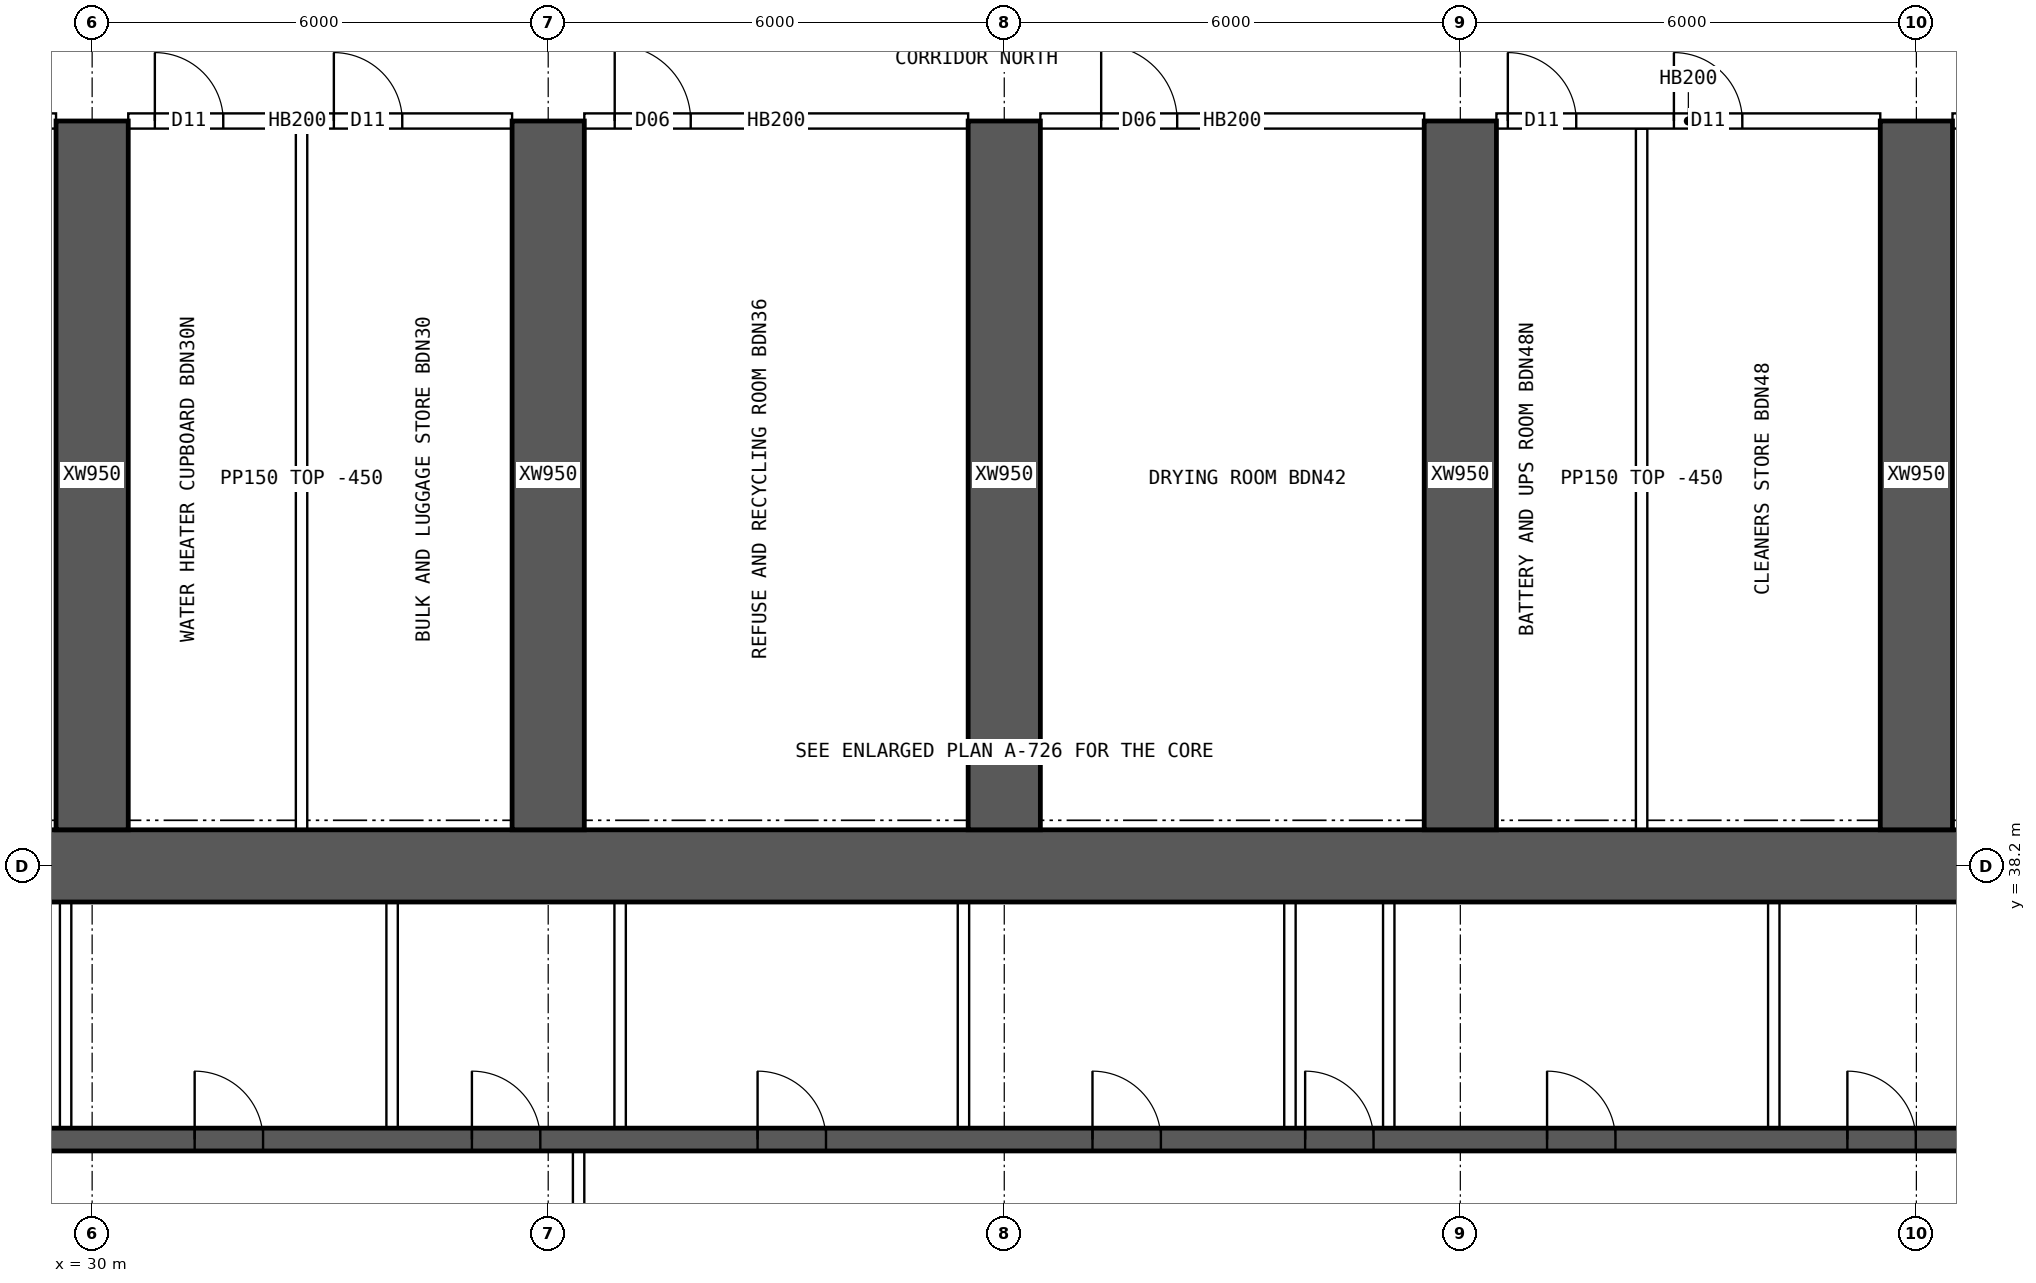
"""IFC4 building model, lengths in metres.
Left out: names, types, materials, properties, quantities, classifications, styles, units other than length and angle.
Written with IfcOpenShell. Run it as: python <this file> out.ifc"""

import sys

from ifc_helpers import new_model, si_unit, direction, frame, frame_2d, origin, place, context, subcontext, project, spatial, rectangle, extrude, element, fill, save


model = new_model("IFC4")
c1 = context("Model", 3, precision=1e-05, world=origin(), true_north=direction((0.0, 1.0)))
c2 = subcontext(c1, "Body", "Model", "MODEL_VIEW")
j1 = project(units=[si_unit("LENGTHUNIT", "METRE"), si_unit("PLANEANGLEUNIT", "RADIAN")], contexts=[c1])
p1 = place(None, origin())
s1 = spatial("IfcSite", under=j1, at=p1, CompositionType="ELEMENT")
p2 = place(p1, origin())
s2 = spatial("IfcBuilding", under=s1, at=p2, CompositionType="ELEMENT")
p3 = place(p2, frame((0.0, 0.0, 95.65)))
s3 = spatial("IfcBuildingStorey", under=s2, at=p3, CompositionType="ELEMENT", Elevation=95.65)
p4 = place(p3, frame((18.0, 38.2, 0.0), z_axis=(0.0, 0.0, 1.0), x_axis=(1.0, 0.0, 0.0)))
e1 = element("IfcWall", 1, at=p4, inside=s3, PredefinedType="SHEAR", context=c2, shape_type="SweptSolid", body=[
    extrude(rectangle(XDim=48.0, YDim=0.95, at=frame_2d((24.0, 0.0))), origin(), (0.0, 0.0, 1.0), 3.75),
])
p5 = place(p3, frame((18.475, 34.6, 0.0), z_axis=(0.0, 0.0, 1.0), x_axis=(1.0, 0.0, 0.0)))
e2 = element("IfcWall", 2, at=p5, inside=s3, PredefinedType="SHEAR", context=c2, shape_type="SweptSolid", body=[
    extrude(rectangle(XDim=47.05, YDim=0.3, at=frame_2d((23.525, 0.0))), origin(), (0.0, 0.0, 1.0), 3.75),
])
p6 = place(p5, frame((0.9, 0.0, 0.0)))
e3 = element("IfcOpeningElement", 3, at=p6, cuts=e2, PredefinedType="OPENING", context=c2, shape_type="SweptSolid", body=[
    extrude(rectangle(XDim=1.1, YDim=2.1, at=frame_2d((0.55, 1.05))), frame((0.0, 0.16, 0.0), z_axis=(0.0, -1.0, 0.0), x_axis=(1.0, 0.0, 0.0)), (0.0, 0.0, 1.0), 0.32),
])
p7 = place(p5, frame((45.05, 0.0, 0.0)))
e4 = element("IfcOpeningElement", 4, at=p7, cuts=e2, PredefinedType="OPENING", context=c2, shape_type="SweptSolid", body=[
    extrude(rectangle(XDim=1.1, YDim=2.1, at=frame_2d((0.55, 1.05))), frame((0.0, 0.16, 0.0), z_axis=(0.0, -1.0, 0.0), x_axis=(1.0, 0.0, 0.0)), (0.0, 0.0, 1.0), 0.32),
])
p8 = place(p5, frame((4.125, 0.0, 0.0)))
e5 = element("IfcOpeningElement", 5, at=p8, cuts=e2, PredefinedType="OPENING", context=c2, shape_type="SweptSolid", body=[
    extrude(rectangle(XDim=0.9, YDim=2.1, at=frame_2d((0.45, 1.05))), frame((0.0, 0.16, 0.0), z_axis=(0.0, -1.0, 0.0), x_axis=(1.0, 0.0, 0.0)), (0.0, 0.0, 1.0), 0.32),
])
p9 = place(p5, frame((42.025, 0.0, 0.0)))
e6 = element("IfcOpeningElement", 6, at=p9, cuts=e2, PredefinedType="OPENING", context=c2, shape_type="SweptSolid", body=[
    extrude(rectangle(XDim=0.9, YDim=2.1, at=frame_2d((0.45, 1.05))), frame((0.0, 0.16, 0.0), z_axis=(0.0, -1.0, 0.0), x_axis=(1.0, 0.0, 0.0)), (0.0, 0.0, 1.0), 0.32),
])
p10 = place(p5, frame((8.9, 0.0, 0.0)))
e7 = element("IfcOpeningElement", 7, at=p10, cuts=e2, PredefinedType="OPENING", context=c2, shape_type="SweptSolid", body=[
    extrude(rectangle(XDim=0.9, YDim=2.1, at=frame_2d((0.45, 1.05))), frame((0.0, 0.16, 0.0), z_axis=(0.0, -1.0, 0.0), x_axis=(1.0, 0.0, 0.0)), (0.0, 0.0, 1.0), 0.32),
])
p11 = place(p5, frame((12.874, 0.0, 0.0)))
e8 = element("IfcOpeningElement", 8, at=p11, cuts=e2, PredefinedType="OPENING", context=c2, shape_type="SweptSolid", body=[
    extrude(rectangle(XDim=0.9, YDim=2.1, at=frame_2d((0.45, 1.05))), frame((0.0, 0.16, 0.0), z_axis=(0.0, -1.0, 0.0), x_axis=(1.0, 0.0, 0.0)), (0.0, 0.0, 1.0), 0.32),
])
p12 = place(p5, frame((16.521, 0.0, 0.0)))
e9 = element("IfcOpeningElement", 9, at=p12, cuts=e2, PredefinedType="OPENING", context=c2, shape_type="SweptSolid", body=[
    extrude(rectangle(XDim=0.9, YDim=2.1, at=frame_2d((0.45, 1.05))), frame((0.0, 0.16, 0.0), z_axis=(0.0, -1.0, 0.0), x_axis=(1.0, 0.0, 0.0)), (0.0, 0.0, 1.0), 0.32),
])
p13 = place(p5, frame((20.28, 0.0, 0.0)))
e10 = element("IfcOpeningElement", 10, at=p13, cuts=e2, PredefinedType="OPENING", context=c2, shape_type="SweptSolid", body=[
    extrude(rectangle(XDim=0.9, YDim=2.1, at=frame_2d((0.45, 1.05))), frame((0.0, 0.16, 0.0), z_axis=(0.0, -1.0, 0.0), x_axis=(1.0, 0.0, 0.0)), (0.0, 0.0, 1.0), 0.32),
])
p14 = place(p5, frame((24.686, 0.0, 0.0)))
e11 = element("IfcOpeningElement", 11, at=p14, cuts=e2, PredefinedType="OPENING", context=c2, shape_type="SweptSolid", body=[
    extrude(rectangle(XDim=0.9, YDim=2.1, at=frame_2d((0.45, 1.05))), frame((0.0, 0.16, 0.0), z_axis=(0.0, -1.0, 0.0), x_axis=(1.0, 0.0, 0.0)), (0.0, 0.0, 1.0), 0.32),
])
p15 = place(p5, frame((27.483, 0.0, 0.0)))
e12 = element("IfcOpeningElement", 12, at=p15, cuts=e2, PredefinedType="OPENING", context=c2, shape_type="SweptSolid", body=[
    extrude(rectangle(XDim=0.9, YDim=2.1, at=frame_2d((0.45, 1.05))), frame((0.0, 0.16, 0.0), z_axis=(0.0, -1.0, 0.0), x_axis=(1.0, 0.0, 0.0)), (0.0, 0.0, 1.0), 0.32),
])
p16 = place(p5, frame((30.666, 0.0, 0.0)))
e13 = element("IfcOpeningElement", 13, at=p16, cuts=e2, PredefinedType="OPENING", context=c2, shape_type="SweptSolid", body=[
    extrude(rectangle(XDim=0.9, YDim=2.1, at=frame_2d((0.45, 1.05))), frame((0.0, 0.16, 0.0), z_axis=(0.0, -1.0, 0.0), x_axis=(1.0, 0.0, 0.0)), (0.0, 0.0, 1.0), 0.32),
])
p17 = place(p5, frame((34.617, 0.0, 0.0)))
e14 = element("IfcOpeningElement", 14, at=p17, cuts=e2, PredefinedType="OPENING", context=c2, shape_type="SweptSolid", body=[
    extrude(rectangle(XDim=0.9, YDim=2.1, at=frame_2d((0.45, 1.05))), frame((0.0, 0.16, 0.0), z_axis=(0.0, -1.0, 0.0), x_axis=(1.0, 0.0, 0.0)), (0.0, 0.0, 1.0), 0.32),
])
p18 = place(p5, frame((37.555, 0.0, 0.0)))
e15 = element("IfcOpeningElement", 15, at=p18, cuts=e2, PredefinedType="OPENING", context=c2, shape_type="SweptSolid", body=[
    extrude(rectangle(XDim=0.9, YDim=2.1, at=frame_2d((0.45, 1.05))), frame((0.0, 0.16, 0.0), z_axis=(0.0, -1.0, 0.0), x_axis=(1.0, 0.0, 0.0)), (0.0, 0.0, 1.0), 0.32),
])
for number, where, z_axis, x_axis in (
    (16, (30.0, 38.675, 0.0), (0.0, 0.0, 1.0), (0.0, 1.0, 0.0)),
    (17, (36.0, 38.675, 0.0), (0.0, 0.0, 1.0), (0.0, 1.0, 0.0)),
    (18, (42.0, 38.675, 0.0), (0.0, 0.0, 1.0), (0.0, 1.0, 0.0)),
    (19, (48.0, 38.675, 0.0), (0.0, 0.0, 1.0), (0.0, 1.0, 0.0)),
    (20, (54.0, 38.675, 0.0), (0.0, 0.0, 1.0), (0.0, 1.0, 0.0)),
):
    element("IfcWall", number, at=place(p3, frame(where, z_axis=z_axis, x_axis=x_axis)), inside=s3, PredefinedType="SHEAR", context=c2, shape_type="SweptSolid", body=[
        extrude(rectangle(XDim=9.325, YDim=0.95, at=frame_2d((4.663, 0.0))), origin(), (0.0, 0.0, 1.0), 3.75),
    ])
p19 = place(p3, frame((36.4, 30.55, 0.0), z_axis=(0.0, 0.0, 1.0), x_axis=(0.0, 1.0, 0.0)))
e21 = element("IfcWall", 21, at=p19, inside=s3, PredefinedType="SOLIDWALL", context=c2, shape_type="SweptSolid", body=[
    extrude(rectangle(XDim=3.9, YDim=0.15, at=frame_2d((1.95, 0.0))), origin(), (0.0, 0.0, 1.0), 3.3),
])
p20 = place(p19, frame((1.15, 0.0, 0.0)))
e22 = element("IfcOpeningElement", 22, at=p20, cuts=e21, PredefinedType="OPENING", context=c2, shape_type="SweptSolid", body=[
    extrude(rectangle(XDim=1.6, YDim=2.1, at=frame_2d((0.8, 1.05))), frame((0.0, 0.085, 0.0), z_axis=(0.0, -1.0, 0.0), x_axis=(1.0, 0.0, 0.0)), (0.0, 0.0, 1.0), 0.17),
])
for number, where, z_axis, x_axis in (
    (23, (29.651, 34.75, 0.0), (0.0, 0.0, 1.0), (0.0, 1.0, 0.0)),
    (24, (33.946, 34.75, 0.0), (0.0, 0.0, 1.0), (0.0, 1.0, 0.0)),
    (25, (36.946, 34.75, 0.0), (0.0, 0.0, 1.0), (0.0, 1.0, 0.0)),
    (26, (41.463, 34.75, 0.0), (0.0, 0.0, 1.0), (0.0, 1.0, 0.0)),
    (27, (45.758, 34.75, 0.0), (0.0, 0.0, 1.0), (0.0, 1.0, 0.0)),
    (28, (47.058, 34.75, 0.0), (0.0, 0.0, 1.0), (0.0, 1.0, 0.0)),
    (29, (52.124, 34.75, 0.0), (0.0, 0.0, 1.0), (0.0, 1.0, 0.0)),
):
    element("IfcWall", number, at=place(p3, frame(where, z_axis=z_axis, x_axis=x_axis)), inside=s3, PredefinedType="SOLIDWALL", context=c2, shape_type="SweptSolid", body=[
        extrude(rectangle(XDim=2.975, YDim=0.15, at=frame_2d((1.488, 0.0))), origin(), (0.0, 0.0, 1.0), 3.3),
    ])
p21 = place(p3, frame((24.475, 48.0, 0.0), z_axis=(0.0, 0.0, 1.0), x_axis=(1.0, 0.0, 0.0)))
e30 = element("IfcWall", 30, at=p21, inside=s3, PredefinedType="SOLIDWALL", context=c2, shape_type="SweptSolid", body=[
    extrude(rectangle(XDim=5.05, YDim=0.2, at=frame_2d((2.525, 0.0))), origin(), (0.0, 0.0, 1.0), 3.3),
])
p22 = place(p21, frame((0.4, 0.0, 0.0)))
e31 = element("IfcOpeningElement", 31, at=p22, cuts=e30, PredefinedType="OPENING", context=c2, shape_type="SweptSolid", body=[
    extrude(rectangle(XDim=1.0, YDim=2.1, at=frame_2d((0.5, 1.05))), frame((0.0, 0.11, 0.0), z_axis=(0.0, -1.0, 0.0), x_axis=(1.0, 0.0, 0.0)), (0.0, 0.0, 1.0), 0.22),
])
p23 = place(p3, frame((30.475, 48.0, 0.0), z_axis=(0.0, 0.0, 1.0), x_axis=(1.0, 0.0, 0.0)))
e32 = element("IfcWall", 32, at=p23, inside=s3, PredefinedType="SOLIDWALL", context=c2, shape_type="SweptSolid", body=[
    extrude(rectangle(XDim=5.05, YDim=0.2, at=frame_2d((2.525, 0.0))), origin(), (0.0, 0.0, 1.0), 3.3),
])
p24 = place(p23, frame((0.35, 0.0, 0.0)))
e33 = element("IfcOpeningElement", 33, at=p24, cuts=e32, PredefinedType="OPENING", context=c2, shape_type="SweptSolid", body=[
    extrude(rectangle(XDim=0.9, YDim=2.1, at=frame_2d((0.45, 1.05))), frame((0.0, 0.11, 0.0), z_axis=(0.0, -1.0, 0.0), x_axis=(1.0, 0.0, 0.0)), (0.0, 0.0, 1.0), 0.22),
])
p25 = place(p23, frame((2.705, 0.0, 0.0)))
e34 = element("IfcOpeningElement", 34, at=p25, cuts=e32, PredefinedType="OPENING", context=c2, shape_type="SweptSolid", body=[
    extrude(rectangle(XDim=0.9, YDim=2.1, at=frame_2d((0.45, 1.05))), frame((0.0, 0.11, 0.0), z_axis=(0.0, -1.0, 0.0), x_axis=(1.0, 0.0, 0.0)), (0.0, 0.0, 1.0), 0.22),
])
p26 = place(p3, frame((36.475, 48.0, 0.0), z_axis=(0.0, 0.0, 1.0), x_axis=(1.0, 0.0, 0.0)))
e35 = element("IfcWall", 35, at=p26, inside=s3, PredefinedType="SOLIDWALL", context=c2, shape_type="SweptSolid", body=[
    extrude(rectangle(XDim=5.05, YDim=0.2, at=frame_2d((2.525, 0.0))), origin(), (0.0, 0.0, 1.0), 3.3),
])
p27 = place(p26, frame((0.4, 0.0, 0.0)))
e36 = element("IfcOpeningElement", 36, at=p27, cuts=e35, PredefinedType="OPENING", context=c2, shape_type="SweptSolid", body=[
    extrude(rectangle(XDim=1.0, YDim=2.1, at=frame_2d((0.5, 1.05))), frame((0.0, 0.11, 0.0), z_axis=(0.0, -1.0, 0.0), x_axis=(1.0, 0.0, 0.0)), (0.0, 0.0, 1.0), 0.22),
])
p28 = place(p3, frame((42.475, 48.0, 0.0), z_axis=(0.0, 0.0, 1.0), x_axis=(1.0, 0.0, 0.0)))
e37 = element("IfcWall", 37, at=p28, inside=s3, PredefinedType="SOLIDWALL", context=c2, shape_type="SweptSolid", body=[
    extrude(rectangle(XDim=5.05, YDim=0.2, at=frame_2d((2.525, 0.0))), origin(), (0.0, 0.0, 1.0), 3.3),
])
p29 = place(p28, frame((0.8, 0.0, 0.0)))
e38 = element("IfcOpeningElement", 38, at=p29, cuts=e37, PredefinedType="OPENING", context=c2, shape_type="SweptSolid", body=[
    extrude(rectangle(XDim=1.0, YDim=2.1, at=frame_2d((0.5, 1.05))), frame((0.0, 0.11, 0.0), z_axis=(0.0, -1.0, 0.0), x_axis=(1.0, 0.0, 0.0)), (0.0, 0.0, 1.0), 0.22),
])
p30 = place(p3, frame((48.475, 48.0, 0.0), z_axis=(0.0, 0.0, 1.0), x_axis=(1.0, 0.0, 0.0)))
e39 = element("IfcWall", 39, at=p30, inside=s3, PredefinedType="SOLIDWALL", context=c2, shape_type="SweptSolid", body=[
    extrude(rectangle(XDim=5.05, YDim=0.2, at=frame_2d((2.525, 0.0))), origin(), (0.0, 0.0, 1.0), 3.3),
])
p31 = place(p30, frame((0.15, 0.0, 0.0)))
e40 = element("IfcOpeningElement", 40, at=p31, cuts=e39, PredefinedType="OPENING", context=c2, shape_type="SweptSolid", body=[
    extrude(rectangle(XDim=0.9, YDim=2.1, at=frame_2d((0.45, 1.05))), frame((0.0, 0.11, 0.0), z_axis=(0.0, -1.0, 0.0), x_axis=(1.0, 0.0, 0.0)), (0.0, 0.0, 1.0), 0.22),
])
p32 = place(p30, frame((2.335, 0.0, 0.0)))
e41 = element("IfcOpeningElement", 41, at=p32, cuts=e39, PredefinedType="OPENING", context=c2, shape_type="SweptSolid", body=[
    extrude(rectangle(XDim=0.9, YDim=2.1, at=frame_2d((0.45, 1.05))), frame((0.0, 0.11, 0.0), z_axis=(0.0, -1.0, 0.0), x_axis=(1.0, 0.0, 0.0)), (0.0, 0.0, 1.0), 0.22),
])
p33 = place(p3, frame((54.475, 48.0, 0.0), z_axis=(0.0, 0.0, 1.0), x_axis=(1.0, 0.0, 0.0)))
e42 = element("IfcWall", 42, at=p33, inside=s3, PredefinedType="SOLIDWALL", context=c2, shape_type="SweptSolid", body=[
    extrude(rectangle(XDim=5.05, YDim=0.2, at=frame_2d((2.525, 0.0))), origin(), (0.0, 0.0, 1.0), 3.3),
])
p34 = place(p33, frame((0.8, 0.0, 0.0)))
e43 = element("IfcOpeningElement", 43, at=p34, cuts=e42, PredefinedType="OPENING", context=c2, shape_type="SweptSolid", body=[
    extrude(rectangle(XDim=1.0, YDim=2.1, at=frame_2d((0.5, 1.05))), frame((0.0, 0.11, 0.0), z_axis=(0.0, -1.0, 0.0), x_axis=(1.0, 0.0, 0.0)), (0.0, 0.0, 1.0), 0.22),
])
for number, where, z_axis, x_axis in (
    (44, (32.755, 38.675, 0.0), (0.0, 0.0, 1.0), (0.0, 1.0, 0.0)),
    (45, (50.385, 38.675, 0.0), (0.0, 0.0, 1.0), (0.0, 1.0, 0.0)),
):
    element("IfcWall", number, at=place(p3, frame(where, z_axis=z_axis, x_axis=x_axis)), inside=s3, PredefinedType="PARTITIONING", context=c2, shape_type="SweptSolid", body=[
        extrude(rectangle(XDim=9.225, YDim=0.15, at=frame_2d((4.612, 0.0))), origin(), (0.0, 0.0, 1.0), 3.3),
    ])
p35 = place(p11, origin())
e46 = element("IfcDoor", 46, at=p35, inside=s3, OperationType="SINGLE_SWING_LEFT", PredefinedType="DOOR", context=c2, shape_type="SweptSolid", body=[
    extrude(rectangle(XDim=0.9, YDim=2.1, at=frame_2d((0.45, 1.05))), frame((0.0, 0.025, 0.0), z_axis=(0.0, -1.0, 0.0), x_axis=(1.0, 0.0, 0.0)), (0.0, 0.0, 1.0), 0.05),
])
fill(e8, e46)
p36 = place(p12, origin())
e47 = element("IfcDoor", 47, at=p36, inside=s3, OperationType="SINGLE_SWING_LEFT", PredefinedType="DOOR", context=c2, shape_type="SweptSolid", body=[
    extrude(rectangle(XDim=0.9, YDim=2.1, at=frame_2d((0.45, 1.05))), frame((0.0, 0.025, 0.0), z_axis=(0.0, -1.0, 0.0), x_axis=(1.0, 0.0, 0.0)), (0.0, 0.0, 1.0), 0.05),
])
fill(e9, e47)
p37 = place(p13, origin())
e48 = element("IfcDoor", 48, at=p37, inside=s3, OperationType="SINGLE_SWING_LEFT", PredefinedType="DOOR", context=c2, shape_type="SweptSolid", body=[
    extrude(rectangle(XDim=0.9, YDim=2.1, at=frame_2d((0.45, 1.05))), frame((0.0, 0.025, 0.0), z_axis=(0.0, -1.0, 0.0), x_axis=(1.0, 0.0, 0.0)), (0.0, 0.0, 1.0), 0.05),
])
fill(e10, e48)
p38 = place(p14, origin())
e49 = element("IfcDoor", 49, at=p38, inside=s3, OperationType="SINGLE_SWING_LEFT", PredefinedType="DOOR", context=c2, shape_type="SweptSolid", body=[
    extrude(rectangle(XDim=0.9, YDim=2.1, at=frame_2d((0.45, 1.05))), frame((0.0, 0.025, 0.0), z_axis=(0.0, -1.0, 0.0), x_axis=(1.0, 0.0, 0.0)), (0.0, 0.0, 1.0), 0.05),
])
fill(e11, e49)
p39 = place(p15, origin())
e50 = element("IfcDoor", 50, at=p39, inside=s3, OperationType="SINGLE_SWING_LEFT", PredefinedType="DOOR", context=c2, shape_type="SweptSolid", body=[
    extrude(rectangle(XDim=0.9, YDim=2.1, at=frame_2d((0.45, 1.05))), frame((0.0, 0.025, 0.0), z_axis=(0.0, -1.0, 0.0), x_axis=(1.0, 0.0, 0.0)), (0.0, 0.0, 1.0), 0.05),
])
fill(e12, e50)
p40 = place(p16, origin())
e51 = element("IfcDoor", 51, at=p40, inside=s3, OperationType="SINGLE_SWING_LEFT", PredefinedType="DOOR", context=c2, shape_type="SweptSolid", body=[
    extrude(rectangle(XDim=0.9, YDim=2.1, at=frame_2d((0.45, 1.05))), frame((0.0, 0.025, 0.0), z_axis=(0.0, -1.0, 0.0), x_axis=(1.0, 0.0, 0.0)), (0.0, 0.0, 1.0), 0.05),
])
fill(e13, e51)
p41 = place(p17, origin())
e52 = element("IfcDoor", 52, at=p41, inside=s3, OperationType="SINGLE_SWING_LEFT", PredefinedType="DOOR", context=c2, shape_type="SweptSolid", body=[
    extrude(rectangle(XDim=0.9, YDim=2.1, at=frame_2d((0.45, 1.05))), frame((0.0, 0.025, 0.0), z_axis=(0.0, -1.0, 0.0), x_axis=(1.0, 0.0, 0.0)), (0.0, 0.0, 1.0), 0.05),
])
fill(e14, e52)
p42 = place(p24, origin())
e53 = element("IfcDoor", 53, at=p42, inside=s3, OperationType="SINGLE_SWING_LEFT", PredefinedType="DOOR", context=c2, shape_type="SweptSolid", body=[
    extrude(rectangle(XDim=0.9, YDim=2.1, at=frame_2d((0.45, 1.05))), frame((0.0, 0.025, 0.0), z_axis=(0.0, -1.0, 0.0), x_axis=(1.0, 0.0, 0.0)), (0.0, 0.0, 1.0), 0.05),
])
fill(e33, e53)
p43 = place(p25, origin())
e54 = element("IfcDoor", 54, at=p43, inside=s3, OperationType="SINGLE_SWING_LEFT", PredefinedType="DOOR", context=c2, shape_type="SweptSolid", body=[
    extrude(rectangle(XDim=0.9, YDim=2.1, at=frame_2d((0.45, 1.05))), frame((0.0, 0.025, 0.0), z_axis=(0.0, -1.0, 0.0), x_axis=(1.0, 0.0, 0.0)), (0.0, 0.0, 1.0), 0.05),
])
fill(e34, e54)
p44 = place(p27, origin())
e55 = element("IfcDoor", 55, at=p44, inside=s3, OperationType="SINGLE_SWING_LEFT", PredefinedType="DOOR", context=c2, shape_type="SweptSolid", body=[
    extrude(rectangle(XDim=1.0, YDim=2.1, at=frame_2d((0.5, 1.05))), frame((0.0, 0.025, 0.0), z_axis=(0.0, -1.0, 0.0), x_axis=(1.0, 0.0, 0.0)), (0.0, 0.0, 1.0), 0.05),
])
fill(e36, e55)
p45 = place(p29, origin())
e56 = element("IfcDoor", 56, at=p45, inside=s3, OperationType="SINGLE_SWING_LEFT", PredefinedType="DOOR", context=c2, shape_type="SweptSolid", body=[
    extrude(rectangle(XDim=1.0, YDim=2.1, at=frame_2d((0.5, 1.05))), frame((0.0, 0.025, 0.0), z_axis=(0.0, -1.0, 0.0), x_axis=(1.0, 0.0, 0.0)), (0.0, 0.0, 1.0), 0.05),
])
fill(e38, e56)
p46 = place(p31, origin())
e57 = element("IfcDoor", 57, at=p46, inside=s3, OperationType="SINGLE_SWING_LEFT", PredefinedType="DOOR", context=c2, shape_type="SweptSolid", body=[
    extrude(rectangle(XDim=0.9, YDim=2.1, at=frame_2d((0.45, 1.05))), frame((0.0, 0.025, 0.0), z_axis=(0.0, -1.0, 0.0), x_axis=(1.0, 0.0, 0.0)), (0.0, 0.0, 1.0), 0.05),
])
fill(e40, e57)
p47 = place(p32, origin())
e58 = element("IfcDoor", 58, at=p47, inside=s3, OperationType="SINGLE_SWING_LEFT", PredefinedType="DOOR", context=c2, shape_type="SweptSolid", body=[
    extrude(rectangle(XDim=0.9, YDim=2.1, at=frame_2d((0.45, 1.05))), frame((0.0, 0.025, 0.0), z_axis=(0.0, -1.0, 0.0), x_axis=(1.0, 0.0, 0.0)), (0.0, 0.0, 1.0), 0.05),
])
fill(e41, e58)
save(model, sys.argv[1])
